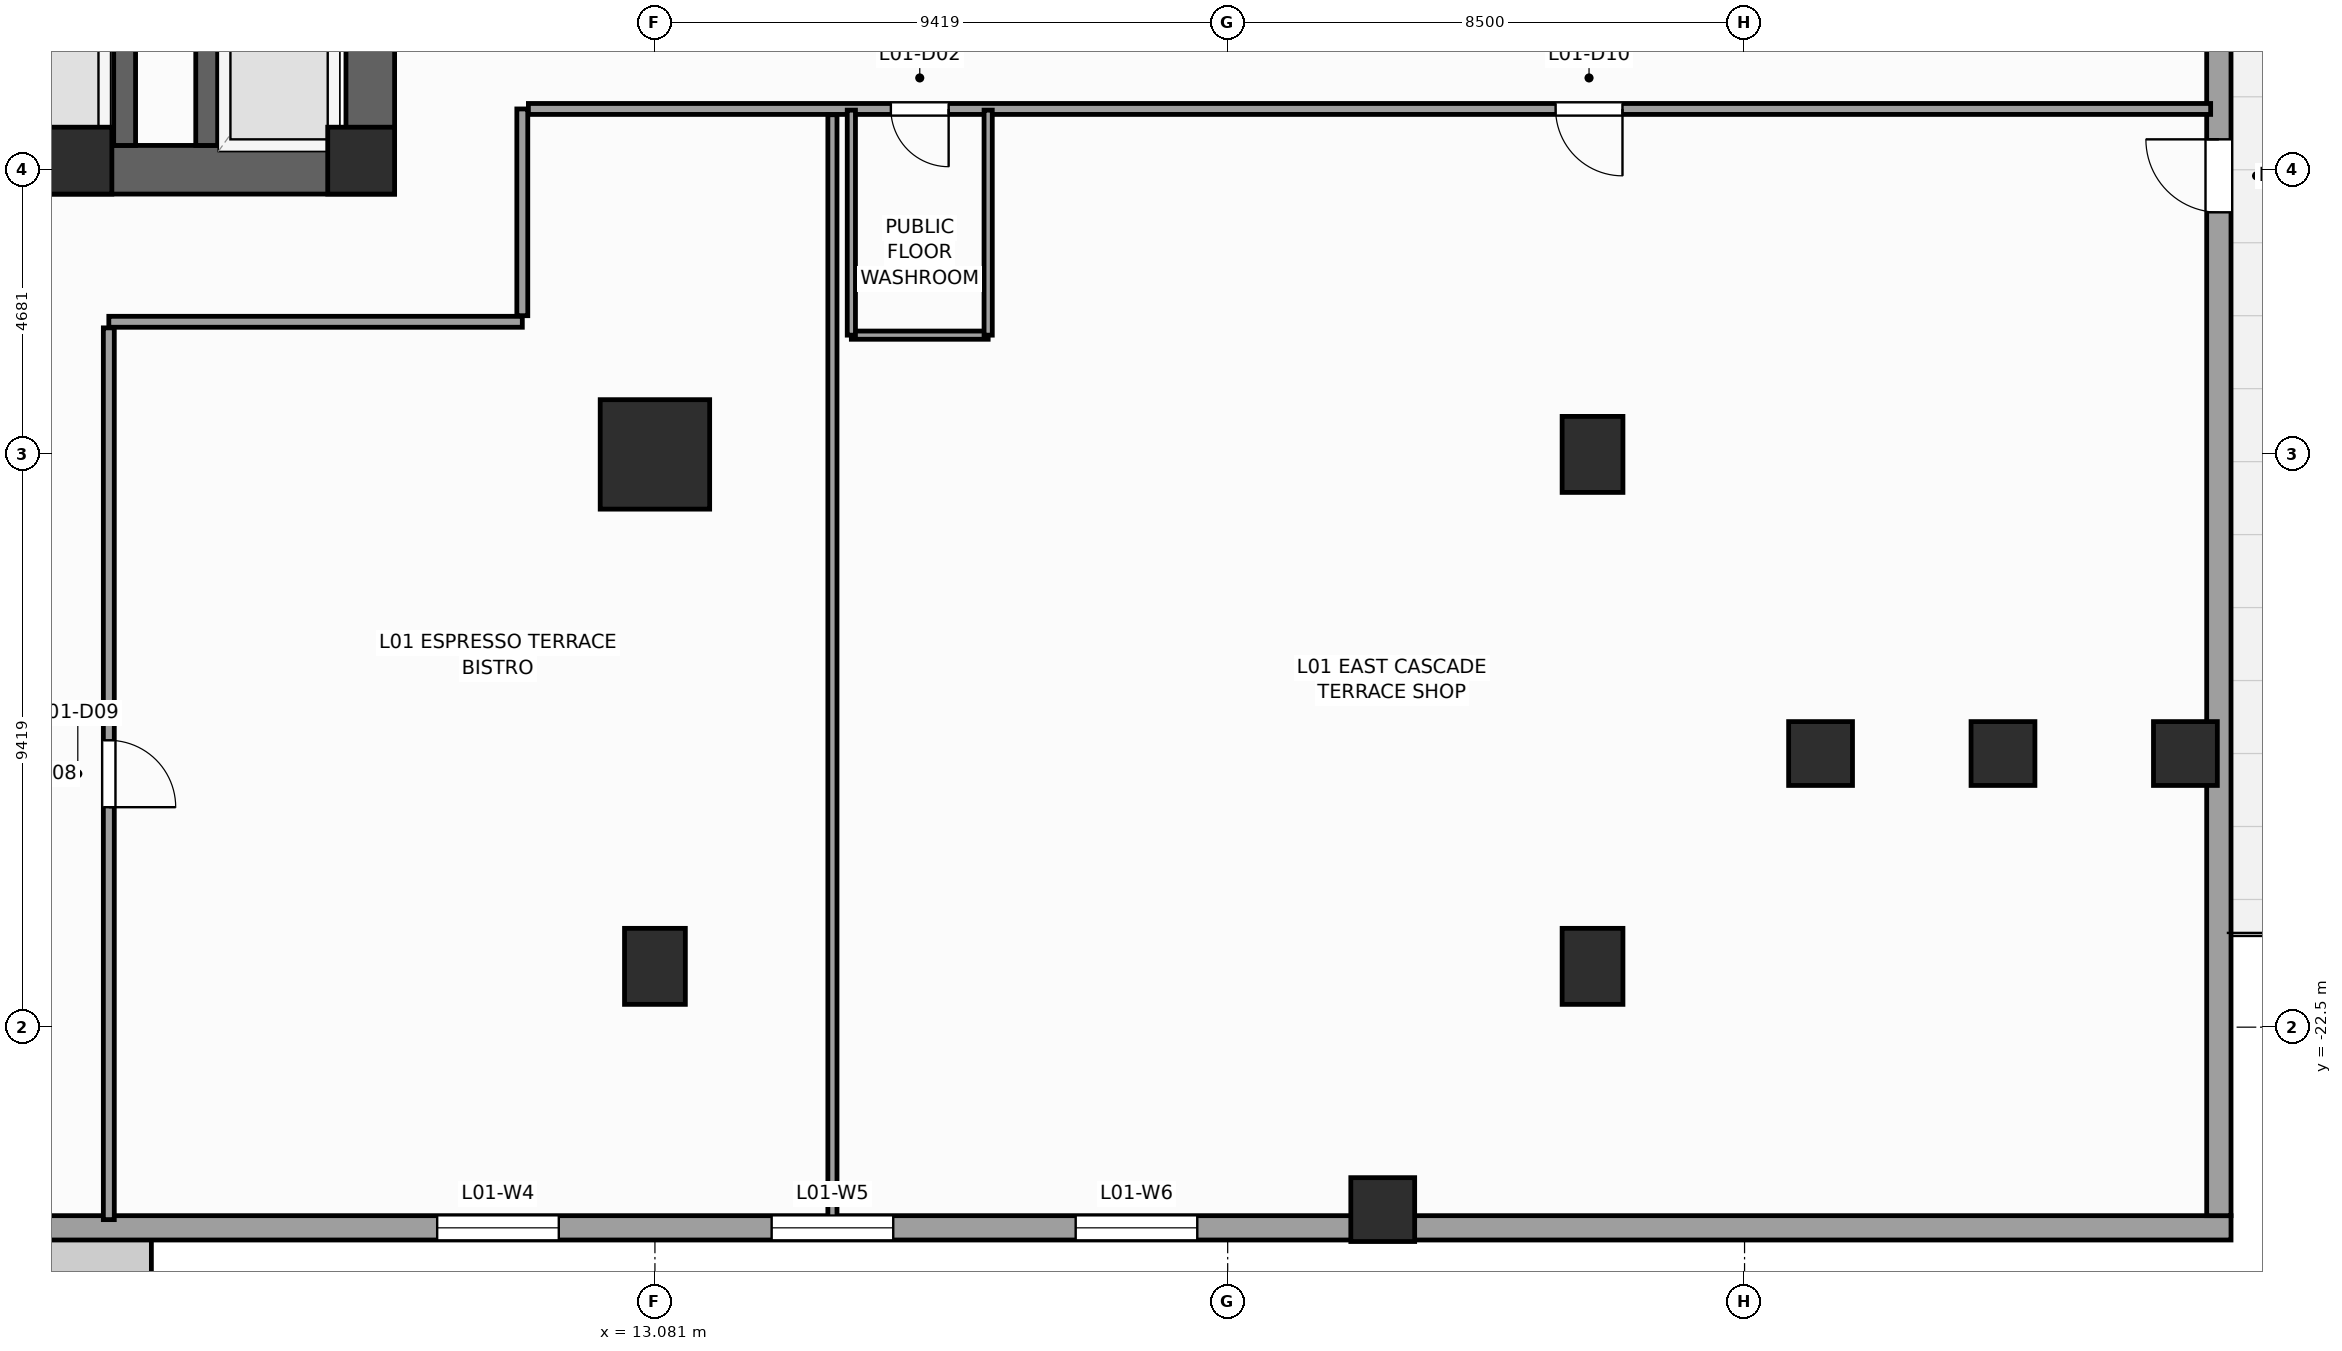
"""IFC4 building model, lengths in metres.
Left out: names, types, materials, properties, quantities, classifications, styles, units other than length and angle.
Written with IfcOpenShell. Run it as: python <this file> out.ifc"""

import sys

from ifc_helpers import new_model, si_unit, direction, frame, frame_2d, origin, origin_2d, place, context, subcontext, project, spatial, rectangle, extrude, source, transform, mapped, element, fill, save


model = new_model("IFC4")
c1 = context("Model", 3, precision=1e-05, world=origin(), true_north=direction((0.0, 1.0)))
c2 = subcontext(c1, "Body", "Model", "MODEL_VIEW")
j1 = project(units=[si_unit("LENGTHUNIT", "METRE"), si_unit("PLANEANGLEUNIT", "RADIAN")], contexts=[c1])
p1 = place(None, origin())
s1 = spatial("IfcSite", under=j1, at=p1, CompositionType="ELEMENT")
p2 = place(p1, origin())
s2 = spatial("IfcBuilding", under=s1, at=p2, CompositionType="ELEMENT")
p3 = place(p2, frame((0.0, 0.0, 6.0)))
s3 = spatial("IfcBuildingStorey", under=s2, at=p3, CompositionType="ELEMENT", Elevation=6.0)
p4 = place(p3, frame((-8.8, -8.4, 0.0), z_axis=(0.0, 0.0, 1.0), x_axis=(1.0, 0.0, 0.0)))
e1 = element("IfcWall", 1, at=p4, inside=s3, PredefinedType="SHEAR", context=c2, shape_type="SweptSolid", body=[
    extrude(rectangle(XDim=17.6, YDim=0.8, at=frame_2d((8.8, 0.0))), origin(), (0.0, 0.0, 1.0), 5.0),
])
p5 = place(p4, frame((8.15, 0.0, 0.0)))
e2 = element("IfcOpeningElement", 2, at=p5, cuts=e1, PredefinedType="OPENING", context=c2, shape_type="SweptSolid", body=[
    extrude(rectangle(XDim=1.3, YDim=2.2, at=frame_2d((0.65, 1.1))), frame((0.0, 0.41, 0.0), z_axis=(0.0, -1.0, 0.0), x_axis=(1.0, 0.0, 0.0)), (0.0, 0.0, 1.0), 0.82),
])
p6 = place(p3, frame((8.4, -8.0, 0.0), z_axis=(0.0, 0.0, 1.0), x_axis=(0.0, 1.0, 0.0)))
e3 = element("IfcWall", 3, at=p6, inside=s3, PredefinedType="SHEAR", context=c2, shape_type="SweptSolid", body=[
    extrude(rectangle(XDim=16.0, YDim=0.8, at=frame_2d((8.0, 0.0))), origin(), (0.0, 0.0, 1.0), 5.0),
])
p7 = place(p6, frame((4.69, 0.0, 0.0)))
e4 = element("IfcOpeningElement", 4, at=p7, cuts=e3, PredefinedType="OPENING", context=c2, shape_type="SweptSolid", body=[
    extrude(rectangle(XDim=1.3, YDim=2.2, at=frame_2d((0.65, 1.1))), frame((0.0, 0.41, 0.0), z_axis=(0.0, -1.0, 0.0), x_axis=(1.0, 0.0, 0.0)), (0.0, 0.0, 1.0), 0.82),
])
p8 = place(p3, frame((4.36, -8.0, 0.0), z_axis=(0.0, 0.0, 1.0), x_axis=(0.0, 1.0, 0.0)))
e5 = element("IfcWall", 5, at=p8, inside=s3, PredefinedType="SHEAR", context=c2, shape_type="SweptSolid", body=[
    extrude(rectangle(XDim=16.0, YDim=0.36, at=frame_2d((8.0, 0.0))), origin(), (0.0, 0.0, 1.0), 5.0),
])
p9 = place(p3, frame((5.71, -8.0, 0.0), z_axis=(0.0, 0.0, 1.0), x_axis=(0.0, 1.0, 0.0)))
e6 = element("IfcWall", 6, at=p9, inside=s3, PredefinedType="SHEAR", context=c2, shape_type="SweptSolid", body=[
    extrude(rectangle(XDim=2.54, YDim=0.36, at=frame_2d((1.27, 0.0))), origin(), (0.0, 0.0, 1.0), 5.0),
])
m1 = source(origin(), c2, "Body", "SweptSolid", [
    extrude(rectangle(XDim=1.1, YDim=1.1, at=origin_2d()), origin(), (0.0, 0.0, 1.0), 5.0),
])
for number, where, z_axis, x_axis in (
    (7, (8.25, -8.25, 0.0), (0.0, 0.0, 1.0), (1.0, 0.0, 0.0)),
    (8, (3.6, -8.25, 0.0), (0.0, 0.0, 1.0), (1.0, 0.0, 0.0)),
):
    element("IfcColumn", number, at=place(p3, frame(where, z_axis=z_axis, x_axis=x_axis)), inside=s3, PredefinedType="PILASTER", context=c2, shape_type="MappedRepresentation", body=[
        mapped(m1, transform((0.0, 0.0, 0.0), scale=1.0)),
    ])
m2 = source(origin(), c2, "Body", "SweptSolid", [
    extrude(rectangle(XDim=1.8, YDim=1.8, at=origin_2d()), origin(), (0.0, 0.0, 1.0), 5.0),
])
p10 = place(p3, frame((13.081, -13.081, 0.0), z_axis=(0.0, 0.0, 1.0), x_axis=(1.0, 0.0, 0.0)))
e9 = element("IfcColumn", 9, at=p10, inside=s3, PredefinedType="COLUMN", context=c2, shape_type="MappedRepresentation", body=[
    mapped(m2, transform((0.0, 0.0, 0.0), scale=1.0)),
])
m3 = source(origin(), c2, "Body", "SweptSolid", [
    extrude(rectangle(XDim=1.0, YDim=1.25, at=origin_2d()), origin(), (0.0, 0.0, 1.0), 5.0),
])
for number, where, z_axis, x_axis in (
    (10, (13.081, -21.5, 0.0), (0.0, 0.0, 1.0), (1.0, 0.0, 0.0)),
    (11, (28.5, -21.5, 0.0), (0.0, 0.0, 1.0), (1.0, 0.0, 0.0)),
    (12, (28.5, -13.081, 0.0), (0.0, 0.0, 1.0), (1.0, 0.0, 0.0)),
):
    element("IfcColumn", number, at=place(p3, frame(where, z_axis=z_axis, x_axis=x_axis)), inside=s3, PredefinedType="COLUMN", context=c2, shape_type="MappedRepresentation", body=[
        mapped(m3, transform((0.0, 0.0, 0.0), scale=1.0)),
    ])
m4 = source(origin(), c2, "Body", "SweptSolid", [
    extrude(rectangle(XDim=1.05, YDim=1.05, at=origin_2d()), origin(), (0.0, 0.0, 1.0), 5.0),
])
for number, where, z_axis, x_axis in (
    (13, (25.05, -25.5, 0.0), (0.0, 0.0, 1.0), (1.0, 0.0, 0.0)),
    (14, (32.25, -18.0, 0.0), (0.0, 0.0, 1.0), (1.0, 0.0, 0.0)),
    (15, (35.25, -18.0, 0.0), (0.0, 0.0, 1.0), (1.0, 0.0, 0.0)),
    (16, (38.25, -18.0, 0.0), (0.0, 0.0, 1.0), (1.0, 0.0, 0.0)),
):
    element("IfcColumn", number, at=place(p3, frame(where, z_axis=z_axis, x_axis=x_axis)), inside=s3, PredefinedType="COLUMN", context=c2, shape_type="MappedRepresentation", body=[
        mapped(m4, transform((0.0, 0.0, 0.0), scale=1.0)),
    ])
p11 = place(p3, frame((-1.0, -25.8, 0.0), z_axis=(0.0, 0.0, 1.0), x_axis=(1.0, 0.0, 0.0)))
e17 = element("IfcWall", 17, at=p11, inside=s3, PredefinedType="STANDARD", context=c2, shape_type="SweptSolid", body=[
    extrude(rectangle(XDim=40.0, YDim=0.4, at=frame_2d((20.0, 0.0))), origin(), (0.0, 0.0, 1.0), 3.85),
])
p12 = place(p11, frame((10.5, 0.0, 0.85)))
e18 = element("IfcOpeningElement", 18, at=p12, cuts=e17, PredefinedType="OPENING", context=c2, shape_type="SweptSolid", body=[
    extrude(rectangle(XDim=2.0, YDim=2.8, at=frame_2d((1.0, 1.4))), frame((0.0, 0.21, 0.0), z_axis=(0.0, -1.0, 0.0), x_axis=(1.0, 0.0, 0.0)), (0.0, 0.0, 1.0), 0.42),
])
p13 = place(p11, frame((16.0, 0.0, 0.85)))
e19 = element("IfcOpeningElement", 19, at=p13, cuts=e17, PredefinedType="OPENING", context=c2, shape_type="SweptSolid", body=[
    extrude(rectangle(XDim=2.0, YDim=2.8, at=frame_2d((1.0, 1.4))), frame((0.0, 0.21, 0.0), z_axis=(0.0, -1.0, 0.0), x_axis=(1.0, 0.0, 0.0)), (0.0, 0.0, 1.0), 0.42),
])
p14 = place(p11, frame((21.0, 0.0, 0.85)))
e20 = element("IfcOpeningElement", 20, at=p14, cuts=e17, PredefinedType="OPENING", context=c2, shape_type="SweptSolid", body=[
    extrude(rectangle(XDim=2.0, YDim=2.8, at=frame_2d((1.0, 1.4))), frame((0.0, 0.21, 0.0), z_axis=(0.0, -1.0, 0.0), x_axis=(1.0, 0.0, 0.0)), (0.0, 0.0, 1.0), 0.42),
])
p15 = place(p3, frame((38.8, -25.6, 0.0), z_axis=(0.0, 0.0, 1.0), x_axis=(0.0, 1.0, 0.0)))
e21 = element("IfcWall", 21, at=p15, inside=s3, PredefinedType="STANDARD", context=c2, shape_type="SweptSolid", body=[
    extrude(rectangle(XDim=51.2, YDim=0.4, at=frame_2d((25.6, 0.0))), origin(), (0.0, 0.0, 1.0), 4.66),
])
p16 = place(p15, frame((16.5, 0.0, 0.0)))
e22 = element("IfcOpeningElement", 22, at=p16, cuts=e21, PredefinedType="OPENING", context=c2, shape_type="SweptSolid", body=[
    extrude(rectangle(XDim=1.2, YDim=2.3, at=frame_2d((0.6, 1.15))), frame((0.0, 0.21, 0.0), z_axis=(0.0, -1.0, 0.0), x_axis=(1.0, 0.0, 0.0)), (0.0, 0.0, 1.0), 0.42),
])
p17 = place(p3, frame((4.1, -10.9, 0.0), z_axis=(0.0, 0.0, 1.0), x_axis=(1.0, 0.0, 0.0)))
e23 = element("IfcWall", 23, at=p17, inside=s3, PredefinedType="PARTITIONING", context=c2, shape_type="SweptSolid", body=[
    extrude(rectangle(XDim=6.8, YDim=0.18, at=frame_2d((3.4, 0.0))), origin(), (0.0, 0.0, 1.0), 4.66),
])
p18 = place(p3, frame((10.9, -10.8, 0.0), z_axis=(0.0, 0.0, 1.0), x_axis=(0.0, 1.0, 0.0)))
e24 = element("IfcWall", 24, at=p18, inside=s3, PredefinedType="PARTITIONING", context=c2, shape_type="SweptSolid", body=[
    extrude(rectangle(XDim=3.4, YDim=0.18, at=frame_2d((1.7, 0.0))), origin(), (0.0, 0.0, 1.0), 4.66),
])
p19 = place(p3, frame((11.0, -7.4, 0.0), z_axis=(0.0, 0.0, 1.0), x_axis=(1.0, 0.0, 0.0)))
e25 = element("IfcWall", 25, at=p19, inside=s3, PredefinedType="PARTITIONING", context=c2, shape_type="SweptSolid", body=[
    extrude(rectangle(XDim=27.665, YDim=0.18, at=frame_2d((13.833, 0.0))), origin(), (0.0, 0.0, 1.0), 4.66),
])
p20 = place(p19, frame((5.961, 0.0, 0.0)))
e26 = element("IfcOpeningElement", 26, at=p20, cuts=e25, PredefinedType="OPENING", context=c2, shape_type="SweptSolid", body=[
    extrude(rectangle(XDim=0.95, YDim=2.1, at=frame_2d((0.475, 1.05))), frame((0.0, 0.1, 0.0), z_axis=(0.0, -1.0, 0.0), x_axis=(1.0, 0.0, 0.0)), (0.0, 0.0, 1.0), 0.2),
])
p21 = place(p19, frame((16.893, 0.0, 0.0)))
e27 = element("IfcOpeningElement", 27, at=p21, cuts=e25, PredefinedType="OPENING", context=c2, shape_type="SweptSolid", body=[
    extrude(rectangle(XDim=1.1, YDim=2.2, at=frame_2d((0.55, 1.1))), frame((0.0, 0.1, 0.0), z_axis=(0.0, -1.0, 0.0), x_axis=(1.0, 0.0, 0.0)), (0.0, 0.0, 1.0), 0.2),
])
p22 = place(p3, frame((4.1, -25.665, 0.0), z_axis=(0.0, 0.0, 1.0), x_axis=(0.0, 1.0, 0.0)))
e28 = element("IfcWall", 28, at=p22, inside=s3, PredefinedType="PARTITIONING", context=c2, shape_type="SweptSolid", body=[
    extrude(rectangle(XDim=14.665, YDim=0.18, at=frame_2d((7.333, 0.0))), origin(), (0.0, 0.0, 1.0), 4.66),
])
p23 = place(p22, frame((6.782, 0.0, 0.0)))
e29 = element("IfcOpeningElement", 29, at=p23, cuts=e28, PredefinedType="OPENING", context=c2, shape_type="SweptSolid", body=[
    extrude(rectangle(XDim=1.1, YDim=2.2, at=frame_2d((0.55, 1.1))), frame((0.0, 0.1, 0.0), z_axis=(0.0, -1.0, 0.0), x_axis=(1.0, 0.0, 0.0)), (0.0, 0.0, 1.0), 0.2),
])
p24 = place(p3, frame((16.0, -25.665, 0.0), z_axis=(0.0, 0.0, 1.0), x_axis=(0.0, 1.0, 0.0)))
e30 = element("IfcWall", 30, at=p24, inside=s3, PredefinedType="PARTITIONING", context=c2, shape_type="SweptSolid", body=[
    extrude(rectangle(XDim=18.17, YDim=0.15, at=frame_2d((9.085, 0.0))), origin(), (0.0, 0.0, 1.0), 4.66),
])
p25 = place(p3, frame((16.311, -11.12, 0.0), z_axis=(0.0, 0.0, 1.0), x_axis=(1.0, 0.0, 0.0)))
e31 = element("IfcWall", 31, at=p25, inside=s3, PredefinedType="PARTITIONING", context=c2, shape_type="SweptSolid", body=[
    extrude(rectangle(XDim=2.25, YDim=0.135, at=frame_2d((1.125, 0.0))), origin(), (0.0, 0.0, 1.0), 4.66),
])
for number, where, z_axis, x_axis in (
    (32, (18.561, -11.12, 0.0), (0.0, 0.0, 1.0), (0.0, 1.0, 0.0)),
    (33, (16.311, -11.12, 0.0), (0.0, 0.0, 1.0), (0.0, 1.0, 0.0)),
):
    element("IfcWall", number, at=place(p3, frame(where, z_axis=z_axis, x_axis=x_axis)), inside=s3, PredefinedType="PARTITIONING", context=c2, shape_type="SweptSolid", body=[
        extrude(rectangle(XDim=3.7, YDim=0.135, at=frame_2d((1.85, 0.0))), origin(), (0.0, 0.0, 1.0), 4.66),
    ])
m5 = source(origin(), c2, "Body", "SweptSolid", [
    extrude(rectangle(XDim=2.0, YDim=2.8, at=frame_2d((1.0, 1.4))), frame((0.0, 0.03, 0.0), z_axis=(0.0, -1.0, 0.0), x_axis=(1.0, 0.0, 0.0)), (0.0, 0.0, 1.0), 0.06),
])
p26 = place(p12, origin())
e34 = element("IfcWindow", 34, at=p26, inside=s3, PartitioningType="SINGLE_PANEL", PredefinedType="WINDOW", context=c2, shape_type="MappedRepresentation", body=[
    mapped(m5, transform((0.0, 0.0, 0.0), scale=1.0)),
])
fill(e18, e34)
p27 = place(p13, origin())
e35 = element("IfcWindow", 35, at=p27, inside=s3, PartitioningType="SINGLE_PANEL", PredefinedType="WINDOW", context=c2, shape_type="MappedRepresentation", body=[
    mapped(m5, transform((0.0, 0.0, 0.0), scale=1.0)),
])
fill(e19, e35)
p28 = place(p14, origin())
e36 = element("IfcWindow", 36, at=p28, inside=s3, PartitioningType="SINGLE_PANEL", PredefinedType="WINDOW", context=c2, shape_type="MappedRepresentation", body=[
    mapped(m5, transform((0.0, 0.0, 0.0), scale=1.0)),
])
fill(e20, e36)
m6 = source(origin(), c2, "Body", "SweptSolid", [
    extrude(rectangle(XDim=1.2, YDim=2.3, at=frame_2d((0.6, 1.15))), frame((0.0, 0.025, 0.0), z_axis=(0.0, -1.0, 0.0), x_axis=(1.0, 0.0, 0.0)), (0.0, 0.0, 1.0), 0.05),
])
p29 = place(p16, origin())
e37 = element("IfcDoor", 37, at=p29, inside=s3, OperationType="SINGLE_SWING_RIGHT", PredefinedType="DOOR", context=c2, shape_type="MappedRepresentation", body=[
    mapped(m6, transform((0.0, 0.0, 0.0), scale=1.0)),
])
fill(e22, e37)
m7 = source(origin(), c2, "Body", "SweptSolid", [
    extrude(rectangle(XDim=0.95, YDim=2.1, at=frame_2d((0.475, 1.05))), frame((0.0, 0.025, 0.0), z_axis=(0.0, -1.0, 0.0), x_axis=(1.0, 0.0, 0.0)), (0.0, 0.0, 1.0), 0.05),
])
p30 = place(p20, frame((0.95, 0.0, 0.0), z_axis=(0.0, 0.0, 1.0), x_axis=(-1.0, 0.0, 0.0)))
e38 = element("IfcDoor", 38, at=p30, inside=s3, OperationType="SINGLE_SWING_RIGHT", PredefinedType="DOOR", context=c2, shape_type="MappedRepresentation", body=[
    mapped(m7, transform((0.0, 0.0, 0.0), scale=1.0)),
])
fill(e26, e38)
m8 = source(origin(), c2, "Body", "SweptSolid", [
    extrude(rectangle(XDim=1.1, YDim=2.2, at=frame_2d((0.55, 1.1))), frame((0.0, 0.025, 0.0), z_axis=(0.0, -1.0, 0.0), x_axis=(1.0, 0.0, 0.0)), (0.0, 0.0, 1.0), 0.05),
])
p31 = place(p23, frame((1.1, 0.0, 0.0), z_axis=(0.0, 0.0, 1.0), x_axis=(-1.0, 0.0, 0.0)))
e39 = element("IfcDoor", 39, at=p31, inside=s3, OperationType="SINGLE_SWING_LEFT", PredefinedType="DOOR", context=c2, shape_type="MappedRepresentation", body=[
    mapped(m8, transform((0.0, 0.0, 0.0), scale=1.0)),
])
fill(e29, e39)
p32 = place(p21, frame((1.1, 0.0, 0.0), z_axis=(0.0, 0.0, 1.0), x_axis=(-1.0, 0.0, 0.0)))
e40 = element("IfcDoor", 40, at=p32, inside=s3, OperationType="SINGLE_SWING_RIGHT", PredefinedType="DOOR", context=c2, shape_type="MappedRepresentation", body=[
    mapped(m8, transform((0.0, 0.0, 0.0), scale=1.0)),
])
fill(e27, e40)
save(model, sys.argv[1])
